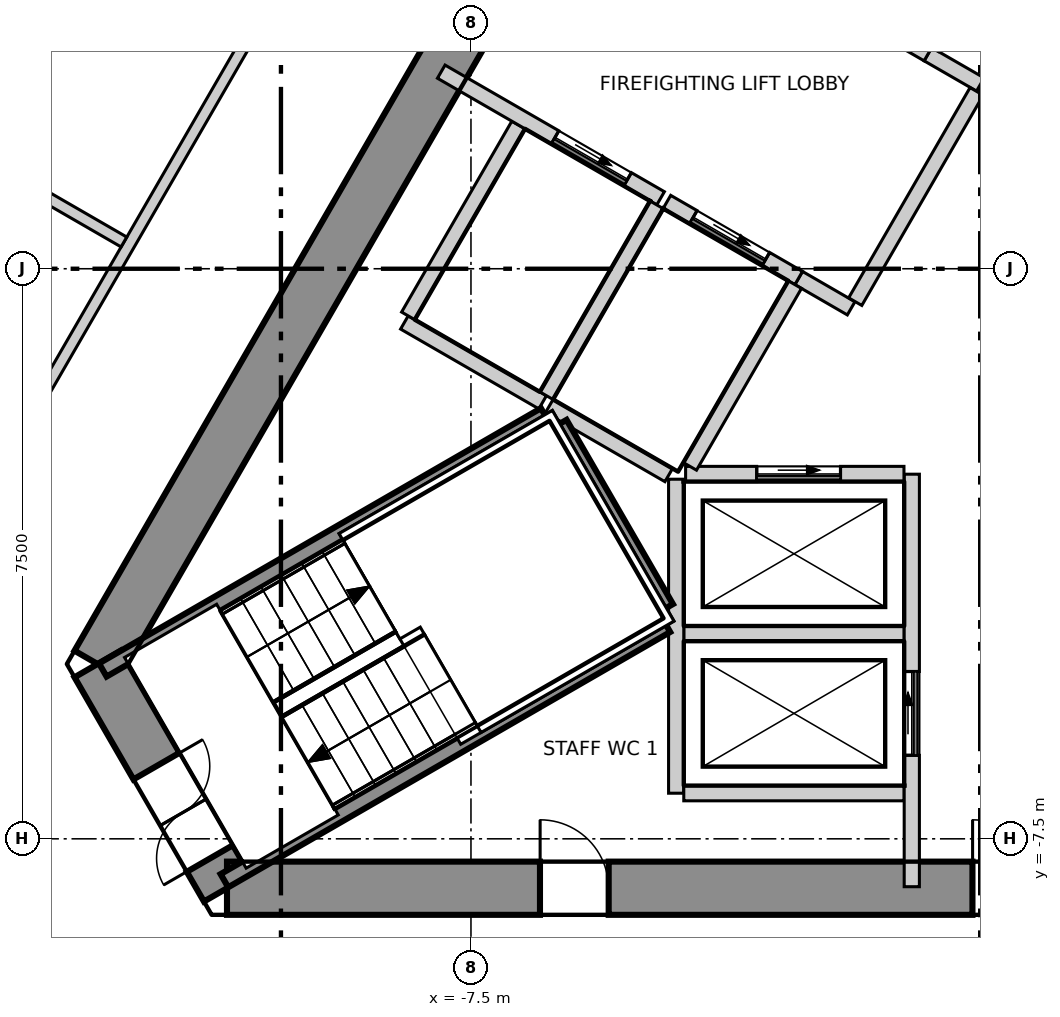
"""IFC4 building model, lengths in metres.
Left out: names, types, materials, properties, quantities, classifications, styles, units other than length and angle.
Written with IfcOpenShell. Run it as: python <this file> out.ifc"""

import sys

from ifc_helpers import new_model, si_unit, direction, frame, frame_2d, origin, place, context, subcontext, project, spatial, polyline, rectangle, outline, extrude, element, fill, save


model = new_model("IFC4")
c1 = context("Model", 3, precision=1e-05, world=origin(), true_north=direction((0.0, 1.0)))
c2 = subcontext(c1, "Body", "Model", "MODEL_VIEW")
j1 = project(units=[si_unit("LENGTHUNIT", "METRE"), si_unit("PLANEANGLEUNIT", "RADIAN")], contexts=[c1])
p1 = place(None, origin())
s1 = spatial("IfcSite", under=j1, at=p1, CompositionType="ELEMENT")
p2 = place(p1, origin())
s2 = spatial("IfcBuilding", under=s1, at=p2, CompositionType="ELEMENT")
p3 = place(p2, frame((0.0, 0.0, 251.3)))
s3 = spatial("IfcBuildingStorey", under=s2, at=p3, CompositionType="ELEMENT", Elevation=251.3)
p4 = place(p3, frame((-1.703, 13.35, -0.3), z_axis=(0.0, 0.0, 1.0), x_axis=(-0.500011533395, -0.866018744874, 0.0)))
e1 = element("IfcWall", 1, at=p4, inside=s3, PredefinedType="SHEAR", context=c2, shape_type="SweptSolid", body=[
    extrude(outline(polyline([(-0.202, -0.35), (1.782, -0.35), (3.766, -0.35), (5.75, -0.35), (7.734, -0.35), (9.718, -0.35), (11.702, -0.35), (13.686, -0.35), (15.67, -0.35), (17.654, -0.35), (19.638, -0.35), (21.622, -0.35), (21.218, 0.35), (19.307, 0.35), (17.397, 0.35), (15.486, 0.35), (13.576, 0.35), (11.665, 0.35), (9.755, 0.35), (7.844, 0.35), (5.934, 0.35), (4.023, 0.35), (2.113, 0.35), (0.202, 0.35), (-0.202, -0.35)])), origin(), (0.0, 0.0, 1.0), 4.2),
])
p5 = place(p4, frame((10.16, 0.0, 0.3)))
e2 = element("IfcOpeningElement", 2, at=p5, cuts=e1, PredefinedType="OPENING", context=c2, shape_type="SweptSolid", body=[
    extrude(rectangle(XDim=1.1, YDim=2.1, at=frame_2d((0.55, 1.05))), frame((0.0, 0.36, 0.0), z_axis=(0.0, -1.0, 0.0), x_axis=(1.0, 0.0, 0.0)), (0.0, 0.0, 1.0), 0.72),
])
p6 = place(p3, frame((-12.413, -5.2, -0.3), z_axis=(0.0, 0.0, 1.0), x_axis=(0.49999337185, -0.866029230515, 0.0)))
e3 = element("IfcWall", 3, at=p6, inside=s3, PredefinedType="SHEAR", context=c2, shape_type="SweptSolid", body=[
    extrude(outline(polyline([(-0.202, -0.35), (1.703, -0.35), (3.608, -0.35), (3.204, 0.35), (1.703, 0.35), (0.202, 0.35), (-0.202, -0.35)])), origin(), (0.0, 0.0, 1.0), 4.2),
])
p7 = place(p6, frame((1.553, 0.0, 0.3)))
e4 = element("IfcOpeningElement", 4, at=p7, cuts=e3, PredefinedType="OPENING", context=c2, shape_type="SweptSolid", body=[
    extrude(rectangle(XDim=1.4, YDim=2.1, at=frame_2d((0.7, 1.05))), frame((0.0, 0.36, 0.0), z_axis=(0.0, -1.0, 0.0), x_axis=(1.0, 0.0, 0.0)), (0.0, 0.0, 1.0), 0.72),
])
p8 = place(p3, frame((-10.71, -8.15, -0.3), z_axis=(0.0, 0.0, 1.0), x_axis=(1.0, 0.0, 0.0)))
e5 = element("IfcWall", 5, at=p8, inside=s3, PredefinedType="SHEAR", context=c2, shape_type="SweptSolid", body=[
    extrude(outline(polyline([(-0.202, -0.35), (1.782, -0.35), (3.766, -0.35), (5.75, -0.35), (7.734, -0.35), (9.718, -0.35), (11.702, -0.35), (13.686, -0.35), (15.67, -0.35), (17.654, -0.35), (19.638, -0.35), (21.622, -0.35), (21.218, 0.35), (19.307, 0.35), (17.397, 0.35), (15.486, 0.35), (13.576, 0.35), (11.665, 0.35), (9.755, 0.35), (7.844, 0.35), (5.934, 0.35), (4.023, 0.35), (2.113, 0.35), (0.202, 0.35), (-0.202, -0.35)])), origin(), (0.0, 0.0, 1.0), 4.2),
])
p9 = place(p8, frame((9.81, 0.0, 0.3)))
e6 = element("IfcOpeningElement", 6, at=p9, cuts=e5, PredefinedType="OPENING", context=c2, shape_type="SweptSolid", body=[
    extrude(rectangle(XDim=1.8, YDim=2.1, at=frame_2d((0.9, 1.05))), frame((0.0, 0.36, 0.0), z_axis=(0.0, -1.0, 0.0), x_axis=(1.0, 0.0, 0.0)), (0.0, 0.0, 1.0), 0.72),
])
p10 = place(p8, frame((4.12, 0.0, 0.3)))
e7 = element("IfcOpeningElement", 7, at=p10, cuts=e5, PredefinedType="OPENING", context=c2, shape_type="SweptSolid", body=[
    extrude(rectangle(XDim=0.9, YDim=2.1, at=frame_2d((0.45, 1.05))), frame((0.0, 0.36, 0.0), z_axis=(0.0, -1.0, 0.0), x_axis=(1.0, 0.0, 0.0)), (0.0, 0.0, 1.0), 0.72),
])
p11 = place(p3, frame((-2.641, 29.489, 0.0), z_axis=(0.0, 0.0, 1.0), x_axis=(-0.500004868955, -0.866022592674, 0.0)))
e8 = element("IfcWall", 8, at=p11, inside=s3, PredefinedType="ELEMENTEDWALL", context=c2, shape_type="SweptSolid", body=[
    extrude(rectangle(XDim=48.416, YDim=0.2, at=frame_2d((24.208, 0.0))), origin(), (0.0, 0.0, 1.0), 3.9),
])
p12 = place(p11, frame((2.067, 0.0, 0.9)))
e9 = element("IfcOpeningElement", 9, at=p12, cuts=e8, PredefinedType="OPENING", context=c2, shape_type="SweptSolid", body=[
    extrude(rectangle(XDim=4.2, YDim=2.5, at=frame_2d((2.1, 1.25))), frame((0.0, 0.11, 0.0), z_axis=(0.0, -1.0, 0.0), x_axis=(1.0, 0.0, 0.0)), (0.0, 0.0, 1.0), 0.22),
])
p13 = place(p11, frame((7.796, 0.0, 0.9)))
e10 = element("IfcOpeningElement", 10, at=p13, cuts=e8, PredefinedType="OPENING", context=c2, shape_type="SweptSolid", body=[
    extrude(rectangle(XDim=4.2, YDim=2.5, at=frame_2d((2.1, 1.25))), frame((0.0, 0.11, 0.0), z_axis=(0.0, -1.0, 0.0), x_axis=(1.0, 0.0, 0.0)), (0.0, 0.0, 1.0), 0.22),
])
p14 = place(p11, frame((13.524, 0.0, 0.9)))
e11 = element("IfcOpeningElement", 11, at=p14, cuts=e8, PredefinedType="OPENING", context=c2, shape_type="SweptSolid", body=[
    extrude(rectangle(XDim=4.2, YDim=2.5, at=frame_2d((2.1, 1.25))), frame((0.0, 0.11, 0.0), z_axis=(0.0, -1.0, 0.0), x_axis=(1.0, 0.0, 0.0)), (0.0, 0.0, 1.0), 0.22),
])
p15 = place(p11, frame((19.253, 0.0, 0.9)))
e12 = element("IfcOpeningElement", 12, at=p15, cuts=e8, PredefinedType="OPENING", context=c2, shape_type="SweptSolid", body=[
    extrude(rectangle(XDim=4.2, YDim=2.5, at=frame_2d((2.1, 1.25))), frame((0.0, 0.11, 0.0), z_axis=(0.0, -1.0, 0.0), x_axis=(1.0, 0.0, 0.0)), (0.0, 0.0, 1.0), 0.22),
])
p16 = place(p11, frame((24.982, 0.0, 0.9)))
e13 = element("IfcOpeningElement", 13, at=p16, cuts=e8, PredefinedType="OPENING", context=c2, shape_type="SweptSolid", body=[
    extrude(rectangle(XDim=4.2, YDim=2.5, at=frame_2d((2.1, 1.25))), frame((0.0, 0.11, 0.0), z_axis=(0.0, -1.0, 0.0), x_axis=(1.0, 0.0, 0.0)), (0.0, 0.0, 1.0), 0.22),
])
p17 = place(p11, frame((30.711, 0.0, 0.9)))
e14 = element("IfcOpeningElement", 14, at=p17, cuts=e8, PredefinedType="OPENING", context=c2, shape_type="SweptSolid", body=[
    extrude(rectangle(XDim=4.2, YDim=2.5, at=frame_2d((2.1, 1.25))), frame((0.0, 0.11, 0.0), z_axis=(0.0, -1.0, 0.0), x_axis=(1.0, 0.0, 0.0)), (0.0, 0.0, 1.0), 0.22),
])
p18 = place(p11, frame((36.439, 0.0, 0.9)))
e15 = element("IfcOpeningElement", 15, at=p18, cuts=e8, PredefinedType="OPENING", context=c2, shape_type="SweptSolid", body=[
    extrude(rectangle(XDim=4.2, YDim=2.5, at=frame_2d((2.1, 1.25))), frame((0.0, 0.11, 0.0), z_axis=(0.0, -1.0, 0.0), x_axis=(1.0, 0.0, 0.0)), (0.0, 0.0, 1.0), 0.22),
])
p19 = place(p11, frame((42.168, 0.0, 0.9)))
e16 = element("IfcOpeningElement", 16, at=p19, cuts=e8, PredefinedType="OPENING", context=c2, shape_type="SweptSolid", body=[
    extrude(rectangle(XDim=4.2, YDim=2.5, at=frame_2d((2.1, 1.25))), frame((0.0, 0.11, 0.0), z_axis=(0.0, -1.0, 0.0), x_axis=(1.0, 0.0, 0.0)), (0.0, 0.0, 1.0), 0.22),
])
p20 = place(p3, frame((-15.184, -5.2, 0.0), z_axis=(0.0, 0.0, 1.0), x_axis=(0.499984831513, 0.866034161138, 0.0)))
e17 = element("IfcWall", 17, at=p20, inside=s3, PredefinedType="PARTITIONING", context=c2, shape_type="SweptSolid", body=[
    extrude(rectangle(XDim=24.191, YDim=0.15, at=frame_2d((12.095, 0.0))), origin(), (0.0, 0.0, 1.0), 3.9),
])
p21 = place(p20, frame((20.408, 0.0, 0.0)))
e18 = element("IfcOpeningElement", 18, at=p21, cuts=e17, PredefinedType="OPENING", context=c2, shape_type="SweptSolid", body=[
    extrude(rectangle(XDim=1.2, YDim=2.1, at=frame_2d((0.6, 1.05))), frame((0.0, 0.085, 0.0), z_axis=(0.0, -1.0, 0.0), x_axis=(1.0, 0.0, 0.0)), (0.0, 0.0, 1.0), 0.17),
])
p22 = place(p20, frame((11.596, 0.0, 0.0)))
e19 = element("IfcOpeningElement", 19, at=p22, cuts=e17, PredefinedType="OPENING", context=c2, shape_type="SweptSolid", body=[
    extrude(rectangle(XDim=1.0, YDim=2.1, at=frame_2d((0.5, 1.05))), frame((0.0, 0.085, 0.0), z_axis=(0.0, -1.0, 0.0), x_axis=(1.0, 0.0, 0.0)), (0.0, 0.0, 1.0), 0.17),
])
p23 = place(p20, frame((2.584, 0.0, 0.0)))
e20 = element("IfcOpeningElement", 20, at=p23, cuts=e17, PredefinedType="OPENING", context=c2, shape_type="SweptSolid", body=[
    extrude(rectangle(XDim=1.2, YDim=2.1, at=frame_2d((0.6, 1.05))), frame((0.0, 0.085, 0.0), z_axis=(0.0, -1.0, 0.0), x_axis=(1.0, 0.0, 0.0)), (0.0, 0.0, 1.0), 0.17),
])
p24 = place(p3, frame((-17.614, 3.555, 0.0), z_axis=(0.0, 0.0, 1.0), x_axis=(0.866046605956, -0.499963274963, 0.0)))
e21 = element("IfcWall", 21, at=p24, inside=s3, PredefinedType="PARTITIONING", context=c2, shape_type="SweptSolid", body=[
    extrude(rectangle(XDim=6.406, YDim=0.15, at=frame_2d((3.203, 0.0))), origin(), (0.0, 0.0, 1.0), 3.9),
])
p25 = place(p3, frame((-8.376, -0.707, 0.0), z_axis=(0.0, 0.0, 1.0), x_axis=(0.866067520717, -0.499927044236, 0.0)))
e22 = element("IfcWall", 22, at=p25, inside=s3, PredefinedType="SOLIDWALL", context=c2, shape_type="SweptSolid", body=[
    extrude(rectangle(XDim=2.1, YDim=0.2, at=frame_2d((1.05, 0.0))), origin(), (0.0, 0.0, 1.0), 3.9),
])
p26 = place(p3, frame((-8.326, -0.62, 0.0), z_axis=(0.0, 0.0, 1.0), x_axis=(0.500023687443, 0.866011727401, 0.0)))
e23 = element("IfcWall", 23, at=p26, inside=s3, PredefinedType="SOLIDWALL", context=c2, shape_type="SweptSolid", body=[
    extrude(rectangle(XDim=2.9, YDim=0.2, at=frame_2d((1.45, 0.0))), origin(), (0.0, 0.0, 1.0), 3.9),
])
p27 = place(p3, frame((-4.7, -4.8, 0.0), z_axis=(0.0, 0.0, 1.0), x_axis=(1.0, 0.0, 0.0)))
e24 = element("IfcWall", 24, at=p27, inside=s3, PredefinedType="SOLIDWALL", context=c2, shape_type="SweptSolid", body=[
    extrude(rectangle(XDim=2.9, YDim=0.2, at=frame_2d((1.45, 0.0))), origin(), (0.0, 0.0, 1.0), 3.9),
])
p28 = place(p3, frame((-4.8, -6.9, 0.0), z_axis=(0.0, 0.0, 1.0), x_axis=(0.0, 1.0, 0.0)))
e25 = element("IfcWall", 25, at=p28, inside=s3, PredefinedType="SOLIDWALL", context=c2, shape_type="SweptSolid", body=[
    extrude(rectangle(XDim=4.131, YDim=0.2, at=frame_2d((2.065, 0.0))), origin(), (0.0, 0.0, 1.0), 3.9),
])
p29 = place(p3, frame((-4.7, -6.9, 0.0), z_axis=(0.0, 0.0, 1.0), x_axis=(1.0, 0.0, 0.0)))
e26 = element("IfcWall", 26, at=p29, inside=s3, PredefinedType="SOLIDWALL", context=c2, shape_type="SweptSolid", body=[
    extrude(rectangle(XDim=2.9, YDim=0.2, at=frame_2d((1.45, 0.0))), origin(), (0.0, 0.0, 1.0), 3.9),
])
p30 = place(p3, frame((-1.7, -8.13, 0.0), z_axis=(0.0, 0.0, 1.0), x_axis=(0.0, 1.0, 0.0)))
e27 = element("IfcWall", 27, at=p30, inside=s3, PredefinedType="SOLIDWALL", context=c2, shape_type="SweptSolid", body=[
    extrude(rectangle(XDim=5.427, YDim=0.2, at=frame_2d((2.713, 0.0))), origin(), (0.0, 0.0, 1.0), 3.9),
])
p31 = place(p30, frame((1.73, 0.0, 0.0)))
e28 = element("IfcOpeningElement", 28, at=p31, cuts=e27, PredefinedType="OPENING", context=c2, shape_type="SweptSolid", body=[
    extrude(rectangle(XDim=1.1, YDim=2.1, at=frame_2d((0.55, 1.05))), frame((0.0, 0.11, 0.0), z_axis=(0.0, -1.0, 0.0), x_axis=(1.0, 0.0, 0.0)), (0.0, 0.0, 1.0), 0.22),
])
p32 = place(p3, frame((-4.676, -2.7, 0.0), z_axis=(0.0, 0.0, 1.0), x_axis=(1.0, 0.0, 0.0)))
e29 = element("IfcWall", 29, at=p32, inside=s3, PredefinedType="SOLIDWALL", context=c2, shape_type="SweptSolid", body=[
    extrude(rectangle(XDim=2.873, YDim=0.2, at=frame_2d((1.437, 0.0))), origin(), (0.0, 0.0, 1.0), 3.9),
])
p33 = place(p32, frame((0.937, 0.0, 0.0)))
e30 = element("IfcOpeningElement", 30, at=p33, cuts=e29, PredefinedType="OPENING", context=c2, shape_type="SweptSolid", body=[
    extrude(rectangle(XDim=1.1, YDim=2.1, at=frame_2d((0.55, 1.05))), frame((0.0, 0.11, 0.0), z_axis=(0.0, -1.0, 0.0), x_axis=(1.0, 0.0, 0.0)), (0.0, 0.0, 1.0), 0.22),
])
p34 = place(p3, frame((-7.891, 2.593, 0.0), z_axis=(0.0, 0.0, 1.0), x_axis=(0.866070917804, -0.499921159118, 0.0)))
e31 = element("IfcWall", 31, at=p34, inside=s3, PredefinedType="SOLIDWALL", context=c2, shape_type="SweptSolid", body=[
    extrude(rectangle(XDim=3.333, YDim=0.2, at=frame_2d((1.666, 0.0))), origin(), (0.0, 0.0, 1.0), 3.9),
])
p35 = place(p34, frame((1.73, 0.0, 0.0)))
e32 = element("IfcOpeningElement", 32, at=p35, cuts=e31, PredefinedType="OPENING", context=c2, shape_type="SweptSolid", body=[
    extrude(rectangle(XDim=1.1, YDim=2.1, at=frame_2d((0.55, 1.05))), frame((0.0, 0.11, 0.0), z_axis=(0.0, -1.0, 0.0), x_axis=(1.0, 0.0, 0.0)), (0.0, 0.0, 1.0), 0.22),
])
p36 = place(p3, frame((-3.188, -0.122, 0.0), z_axis=(0.0, 0.0, 1.0), x_axis=(0.865705793592, -0.50055317294, 0.0)))
e33 = element("IfcWall", 33, at=p36, inside=s3, PredefinedType="SOLIDWALL", context=c2, shape_type="SweptSolid", body=[
    extrude(rectangle(XDim=0.797, YDim=0.2, at=frame_2d((0.398, 0.0))), origin(), (0.0, 0.0, 1.0), 3.9),
])
p37 = place(p3, frame((-1.488, 2.822, 0.0), z_axis=(0.0, 0.0, 1.0), x_axis=(0.866236612152, -0.499633997809, 0.0)))
e34 = element("IfcWall", 34, at=p37, inside=s3, PredefinedType="SOLIDWALL", context=c2, shape_type="SweptSolid", body=[
    extrude(rectangle(XDim=0.796, YDim=0.2, at=frame_2d((0.398, 0.0))), origin(), (0.0, 0.0, 1.0), 3.9),
])
p38 = place(p3, frame((-2.444, -0.433, 0.0), z_axis=(0.0, 0.0, 1.0), x_axis=(0.500035624827, 0.866004834804, 0.0)))
e35 = element("IfcWall", 35, at=p38, inside=s3, PredefinedType="SOLIDWALL", context=c2, shape_type="SweptSolid", body=[
    extrude(rectangle(XDim=3.194, YDim=0.2, at=frame_2d((1.597, 0.0))), origin(), (0.0, 0.0, 1.0), 3.9),
])
p39 = place(p3, frame((-6.507, -1.67, 0.0), z_axis=(0.0, 0.0, 1.0), x_axis=(0.50012328804, 0.865954211699, 0.0)))
e36 = element("IfcWall", 36, at=p39, inside=s3, PredefinedType="SOLIDWALL", context=c2, shape_type="SweptSolid", body=[
    extrude(rectangle(XDim=2.9, YDim=0.2, at=frame_2d((1.45, 0.0))), origin(), (0.0, 0.0, 1.0), 3.9),
])
p40 = place(p3, frame((-6.47, -1.807, 0.0), z_axis=(0.0, 0.0, 1.0), x_axis=(0.865883195159, -0.500246231712, 0.0)))
e37 = element("IfcWall", 37, at=p40, inside=s3, PredefinedType="SOLIDWALL", context=c2, shape_type="SweptSolid", body=[
    extrude(rectangle(XDim=1.815, YDim=0.2, at=frame_2d((0.908, 0.0))), origin(), (0.0, 0.0, 1.0), 3.9),
])
p41 = place(p3, frame((-4.922, 0.879, 0.0), z_axis=(0.0, 0.0, 1.0), x_axis=(0.866073918653, -0.499915960366, 0.0)))
e38 = element("IfcWall", 38, at=p41, inside=s3, PredefinedType="SOLIDWALL", context=c2, shape_type="SweptSolid", body=[
    extrude(rectangle(XDim=2.002, YDim=0.2, at=frame_2d((1.001, 0.0))), origin(), (0.0, 0.0, 1.0), 3.9),
])
p42 = place(p41, frame((0.402, 0.0, 0.0)))
e39 = element("IfcOpeningElement", 39, at=p42, cuts=e38, PredefinedType="OPENING", context=c2, shape_type="SweptSolid", body=[
    extrude(rectangle(XDim=1.1, YDim=2.1, at=frame_2d((0.55, 1.05))), frame((0.0, 0.11, 0.0), z_axis=(0.0, -1.0, 0.0), x_axis=(1.0, 0.0, 0.0)), (0.0, 0.0, 1.0), 0.22),
])
p43 = place(p3, frame((-4.619, -2.6, 0.0), z_axis=(0.0, 0.0, 1.0), x_axis=(0.50009492287, 0.865970593103, 0.0)))
e40 = element("IfcWall", 40, at=p43, inside=s3, PredefinedType="SOLIDWALL", context=c2, shape_type="SweptSolid", body=[
    extrude(rectangle(XDim=2.761, YDim=0.2, at=frame_2d((1.381, 0.0))), origin(), (0.0, 0.0, 1.0), 3.9),
])
p44 = place(p3, frame((-3.309, 3.873, 0.0), z_axis=(0.0, 0.0, 1.0), x_axis=(0.866098583652, -0.499873227325, 0.0)))
e41 = element("IfcWall", 41, at=p44, inside=s3, PredefinedType="SOLIDWALL", context=c2, shape_type="SweptSolid", body=[
    extrude(rectangle(XDim=2.103, YDim=0.2, at=frame_2d((1.051, 0.0))), origin(), (0.0, 0.0, 1.0), 3.9),
])
p45 = place(p44, frame((0.502, 0.0, 0.0)))
e42 = element("IfcOpeningElement", 42, at=p45, cuts=e41, PredefinedType="OPENING", context=c2, shape_type="SweptSolid", body=[
    extrude(rectangle(XDim=1.1, YDim=2.1, at=frame_2d((0.55, 1.05))), frame((0.0, 0.11, 0.0), z_axis=(0.0, -1.0, 0.0), x_axis=(1.0, 0.0, 0.0)), (0.0, 0.0, 1.0), 0.22),
])
p46 = place(p3, frame((-12.344, -5.279, 0.0), z_axis=(0.0, 0.0, 1.0), x_axis=(0.866046323291, 0.499963764601, 0.0)))
e43 = element("IfcWall", 43, at=p46, inside=s3, PredefinedType="SOLIDWALL", context=c2, shape_type="SweptSolid", body=[
    extrude(rectangle(XDim=6.714, YDim=0.2, at=frame_2d((3.357, 0.0))), origin(), (0.0, 0.0, 1.0), 3.9),
])
p47 = place(p3, frame((-6.329, -2.038, 0.0), z_axis=(0.0, 0.0, 1.0), x_axis=(0.500200581029, -0.865909567298, 0.0)))
e44 = element("IfcWall", 44, at=p47, inside=s3, PredefinedType="SOLIDWALL", context=c2, shape_type="SweptSolid", body=[
    extrude(rectangle(XDim=2.799, YDim=0.2, at=frame_2d((1.399, 0.0))), origin(), (0.0, 0.0, 1.0), 3.9),
])
p48 = place(p3, frame((-10.744, -8.051, 0.0), z_axis=(0.0, 0.0, 1.0), x_axis=(0.865983344943, 0.500072840975, 0.0)))
e45 = element("IfcWall", 45, at=p48, inside=s3, PredefinedType="SOLIDWALL", context=c2, shape_type="SweptSolid", body=[
    extrude(rectangle(XDim=6.715, YDim=0.2, at=frame_2d((3.357, 0.0))), origin(), (0.0, 0.0, 1.0), 3.9),
])
p49 = place(p33, origin())
e46 = element("IfcDoor", 46, at=p49, inside=s3, OperationType="SLIDING_TO_LEFT", PredefinedType="DOOR", context=c2, shape_type="SweptSolid", body=[
    extrude(rectangle(XDim=1.1, YDim=2.1, at=frame_2d((0.55, 1.05))), frame((0.0, 0.025, 0.0), z_axis=(0.0, -1.0, 0.0), x_axis=(1.0, 0.0, 0.0)), (0.0, 0.0, 1.0), 0.05),
])
fill(e30, e46)
p50 = place(p31, origin())
e47 = element("IfcDoor", 47, at=p50, inside=s3, OperationType="SLIDING_TO_LEFT", PredefinedType="DOOR", context=c2, shape_type="SweptSolid", body=[
    extrude(rectangle(XDim=1.1, YDim=2.1, at=frame_2d((0.55, 1.05))), frame((0.0, 0.025, 0.0), z_axis=(0.0, -1.0, 0.0), x_axis=(1.0, 0.0, 0.0)), (0.0, 0.0, 1.0), 0.05),
])
fill(e28, e47)
p51 = place(p42, origin())
e48 = element("IfcDoor", 48, at=p51, inside=s3, OperationType="SLIDING_TO_LEFT", PredefinedType="DOOR", context=c2, shape_type="SweptSolid", body=[
    extrude(rectangle(XDim=1.1, YDim=2.1, at=frame_2d((0.55, 1.05))), frame((0.0, 0.025, 0.0), z_axis=(0.0, -1.0, 0.0), x_axis=(1.0, 0.0, 0.0)), (0.0, 0.0, 1.0), 0.05),
])
fill(e39, e48)
p52 = place(p35, origin())
e49 = element("IfcDoor", 49, at=p52, inside=s3, OperationType="SLIDING_TO_LEFT", PredefinedType="DOOR", context=c2, shape_type="SweptSolid", body=[
    extrude(rectangle(XDim=1.1, YDim=2.1, at=frame_2d((0.55, 1.05))), frame((0.0, 0.025, 0.0), z_axis=(0.0, -1.0, 0.0), x_axis=(1.0, 0.0, 0.0)), (0.0, 0.0, 1.0), 0.05),
])
fill(e32, e49)
p53 = place(p9, origin())
e50 = element("IfcDoor", 50, at=p53, inside=s3, OperationType="DOUBLE_DOOR_SINGLE_SWING", PredefinedType="DOOR", context=c2, shape_type="SweptSolid", body=[
    extrude(rectangle(XDim=1.8, YDim=2.1, at=frame_2d((0.9, 1.05))), frame((0.0, 0.025, 0.0), z_axis=(0.0, -1.0, 0.0), x_axis=(1.0, 0.0, 0.0)), (0.0, 0.0, 1.0), 0.05),
])
fill(e6, e50)
p54 = place(p7, origin())
e51 = element("IfcDoor", 51, at=p54, inside=s3, OperationType="DOUBLE_DOOR_SINGLE_SWING", PredefinedType="DOOR", context=c2, shape_type="SweptSolid", body=[
    extrude(rectangle(XDim=1.4, YDim=2.1, at=frame_2d((0.7, 1.05))), frame((0.0, 0.025, 0.0), z_axis=(0.0, -1.0, 0.0), x_axis=(1.0, 0.0, 0.0)), (0.0, 0.0, 1.0), 0.05),
])
fill(e4, e51)
p55 = place(p10, origin())
e52 = element("IfcDoor", 52, at=p55, inside=s3, OperationType="SINGLE_SWING_RIGHT", PredefinedType="DOOR", context=c2, shape_type="SweptSolid", body=[
    extrude(rectangle(XDim=0.9, YDim=2.1, at=frame_2d((0.45, 1.05))), frame((0.0, 0.075, 0.0), z_axis=(0.0, -1.0, 0.0), x_axis=(1.0, 0.0, 0.0)), (0.0, 0.0, 1.0), 0.05),
])
fill(e7, e52)
save(model, sys.argv[1])
